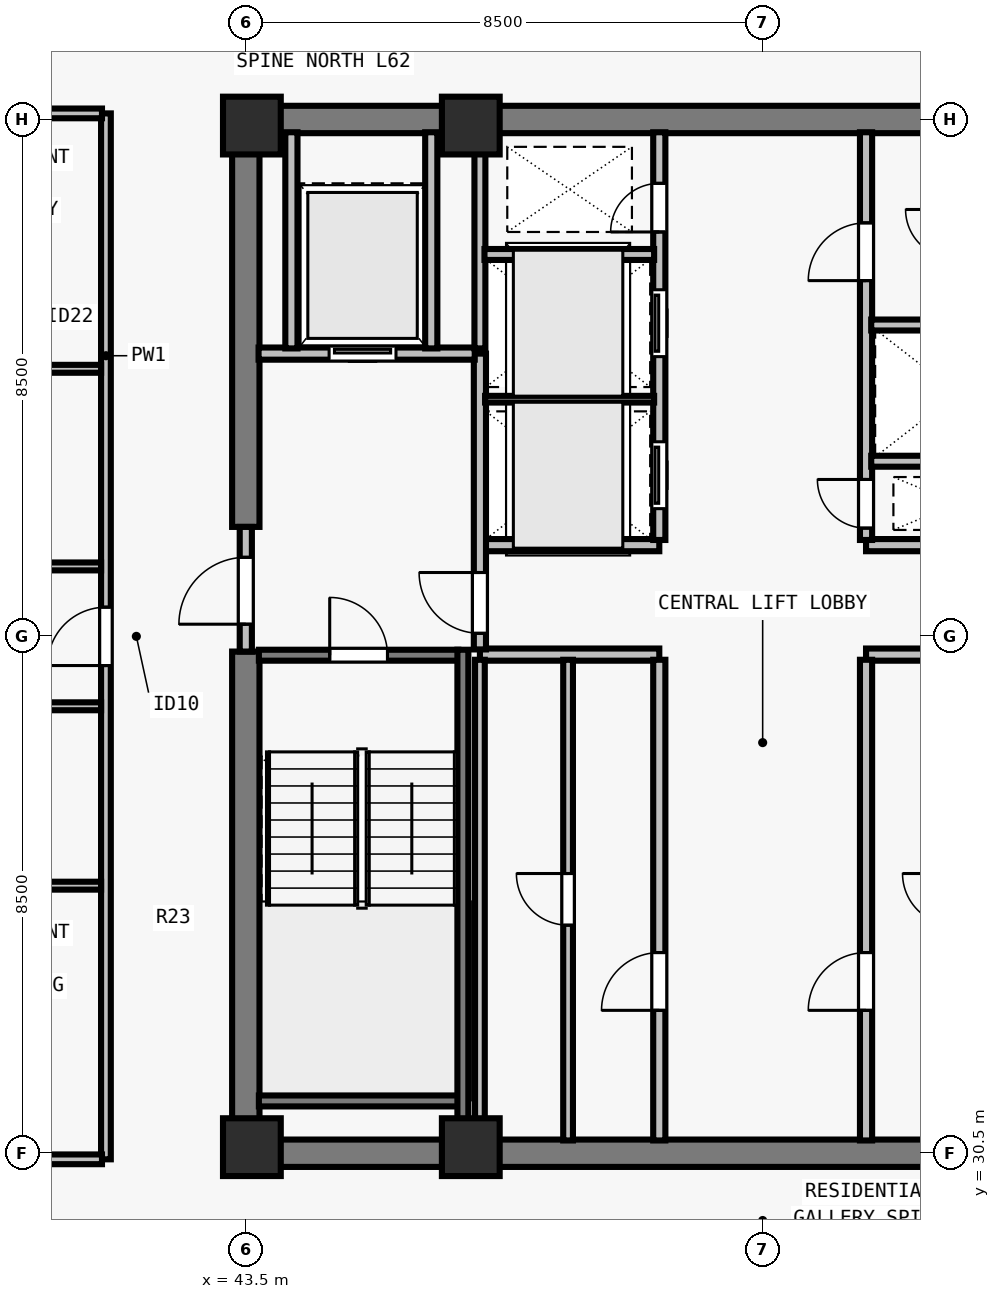
"""IFC4 building model, lengths in metres.
Left out: names, types, materials, properties, quantities, classifications, styles, units other than length and angle.
Written with IfcOpenShell. Run it as: python <this file> out.ifc"""

import sys

from ifc_helpers import new_model, si_unit, direction, frame, frame_2d, origin, origin_2d, place, context, subcontext, project, spatial, rectangle, extrude, element, fill, save


model = new_model("IFC4")
c1 = context("Model", 3, precision=1e-05, world=origin(), true_north=direction((0.0, 1.0)))
c2 = subcontext(c1, "Body", "Model", "MODEL_VIEW")
j1 = project(units=[si_unit("LENGTHUNIT", "METRE"), si_unit("PLANEANGLEUNIT", "RADIAN")], contexts=[c1])
p1 = place(None, origin())
s1 = spatial("IfcSite", under=j1, at=p1, CompositionType="ELEMENT")
p2 = place(p1, origin())
s2 = spatial("IfcBuilding", under=s1, at=p2, CompositionType="ELEMENT")
p3 = place(p2, frame((0.0, 0.0, 227.0)))
s3 = spatial("IfcBuildingStorey", under=s2, at=p3, CompositionType="ELEMENT", Elevation=227.0)
for number, where, z_axis, x_axis in (
    (1, (43.6, 30.6, 0.0), (0.0, 0.0, 1.0), (1.0, 0.0, 0.0)),
    (2, (47.2, 30.6, 0.0), (0.0, 0.0, 1.0), (1.0, 0.0, 0.0)),
    (3, (43.6, 47.4, 0.0), (0.0, 0.0, 1.0), (1.0, 0.0, 0.0)),
    (4, (47.2, 47.4, 0.0), (0.0, 0.0, 1.0), (1.0, 0.0, 0.0)),
):
    element("IfcColumn", number, at=place(p3, frame(where, z_axis=z_axis, x_axis=x_axis)), inside=s3, PredefinedType="COLUMN", context=c2, shape_type="SweptSolid", body=[
        extrude(rectangle(XDim=0.95, YDim=0.95, at=origin_2d()), origin(), (0.0, 0.0, 1.0), 3.5),
    ])
for number, where, z_axis, x_axis in (
    (5, (43.275, 30.5, 0.0), (0.0, 0.0, 1.0), (1.0, 0.0, 0.0)),
    (6, (43.275, 47.5, 0.0), (0.0, 0.0, 1.0), (1.0, 0.0, 0.0)),
):
    element("IfcWall", number, at=place(p3, frame(where, z_axis=z_axis, x_axis=x_axis)), inside=s3, PredefinedType="SHEAR", context=c2, shape_type="SweptSolid", body=[
        extrude(rectangle(XDim=17.45, YDim=0.45, at=frame_2d((8.725, 0.0))), origin(), (0.0, 0.0, 1.0), 3.29),
    ])
p4 = place(p3, frame((43.5, 30.715, 0.0), z_axis=(0.0, 0.0, 1.0), x_axis=(0.0, 1.0, 0.0)))
e7 = element("IfcWall", 7, at=p4, inside=s3, PredefinedType="SHEAR", context=c2, shape_type="SweptSolid", body=[
    extrude(rectangle(XDim=8.035, YDim=0.45, at=frame_2d((4.018, 0.0))), origin(), (0.0, 0.0, 1.0), 3.29),
])
p5 = place(p3, frame((43.5, 40.8, 0.0), z_axis=(0.0, 0.0, 1.0), x_axis=(0.0, 1.0, 0.0)))
e8 = element("IfcWall", 8, at=p5, inside=s3, PredefinedType="SHEAR", context=c2, shape_type="SweptSolid", body=[
    extrude(rectangle(XDim=6.485, YDim=0.45, at=frame_2d((3.242, 0.0))), origin(), (0.0, 0.0, 1.0), 3.29),
])
for number, where, z_axis, x_axis in (
    (9, (47.35, 38.7, 0.0), (0.0, 0.0, 1.0), (1.0, 0.0, 0.0)),
    (10, (47.35, 40.5, 0.0), (0.0, 0.0, 1.0), (1.0, 0.0, 0.0)),
    (11, (53.7, 38.7, 0.0), (0.0, 0.0, 1.0), (1.0, 0.0, 0.0)),
    (12, (53.7, 40.5, 0.0), (0.0, 0.0, 1.0), (1.0, 0.0, 0.0)),
):
    element("IfcWall", number, at=place(p3, frame(where, z_axis=z_axis, x_axis=x_axis)), inside=s3, PredefinedType="SOLIDWALL", context=c2, shape_type="SweptSolid", body=[
        extrude(rectangle(XDim=2.95, YDim=0.2, at=frame_2d((1.475, 0.0))), origin(), (0.0, 0.0, 1.0), 3.29),
    ])
p6 = place(p3, frame((50.3, 30.71, 0.0), z_axis=(0.0, 0.0, 1.0), x_axis=(0.0, 1.0, 0.0)))
e13 = element("IfcWall", 13, at=p6, inside=s3, PredefinedType="SOLIDWALL", context=c2, shape_type="SweptSolid", body=[
    extrude(rectangle(XDim=7.905, YDim=0.2, at=frame_2d((3.953, 0.0))), origin(), (0.0, 0.0, 1.0), 3.29),
])
p7 = place(p6, frame((2.14, 0.0, 0.0)))
e14 = element("IfcOpeningElement", 14, at=p7, cuts=e13, PredefinedType="OPENING", context=c2, shape_type="SweptSolid", body=[
    extrude(rectangle(XDim=0.95, YDim=2.12, at=frame_2d((0.475, 1.06))), frame((0.0, 0.11, 0.0), z_axis=(0.0, -1.0, 0.0), x_axis=(1.0, 0.0, 0.0)), (0.0, 0.0, 1.0), 0.22),
])
p8 = place(p3, frame((53.7, 30.71, 0.0), z_axis=(0.0, 0.0, 1.0), x_axis=(0.0, 1.0, 0.0)))
e15 = element("IfcWall", 15, at=p8, inside=s3, PredefinedType="SOLIDWALL", context=c2, shape_type="SweptSolid", body=[
    extrude(rectangle(XDim=7.905, YDim=0.2, at=frame_2d((3.953, 0.0))), origin(), (0.0, 0.0, 1.0), 3.29),
])
p9 = place(p8, frame((2.14, 0.0, 0.0)))
e16 = element("IfcOpeningElement", 16, at=p9, cuts=e15, PredefinedType="OPENING", context=c2, shape_type="SweptSolid", body=[
    extrude(rectangle(XDim=0.95, YDim=2.12, at=frame_2d((0.475, 1.06))), frame((0.0, 0.11, 0.0), z_axis=(0.0, -1.0, 0.0), x_axis=(1.0, 0.0, 0.0)), (0.0, 0.0, 1.0), 0.22),
])
p10 = place(p3, frame((50.3, 40.585, 0.0), z_axis=(0.0, 0.0, 1.0), x_axis=(0.0, 1.0, 0.0)))
e17 = element("IfcWall", 17, at=p10, inside=s3, PredefinedType="SOLIDWALL", context=c2, shape_type="SweptSolid", body=[
    extrude(rectangle(XDim=6.705, YDim=0.2, at=frame_2d((3.353, 0.0))), origin(), (0.0, 0.0, 1.0), 3.29),
])
p11 = place(p10, frame((0.515, 0.0, 0.0)))
e18 = element("IfcOpeningElement", 18, at=p11, cuts=e17, PredefinedType="OPENING", context=c2, shape_type="SweptSolid", body=[
    extrude(rectangle(XDim=1.1, YDim=2.2, at=frame_2d((0.55, 1.1))), frame((0.0, 0.11, 0.0), z_axis=(0.0, -1.0, 0.0), x_axis=(1.0, 0.0, 0.0)), (0.0, 0.0, 1.0), 0.22),
])
p12 = place(p10, frame((3.015, 0.0, 0.0)))
e19 = element("IfcOpeningElement", 19, at=p12, cuts=e17, PredefinedType="OPENING", context=c2, shape_type="SweptSolid", body=[
    extrude(rectangle(XDim=1.1, YDim=2.2, at=frame_2d((0.55, 1.1))), frame((0.0, 0.11, 0.0), z_axis=(0.0, -1.0, 0.0), x_axis=(1.0, 0.0, 0.0)), (0.0, 0.0, 1.0), 0.22),
])
p13 = place(p10, frame((5.065, 0.0, 0.0)))
e20 = element("IfcOpeningElement", 20, at=p13, cuts=e17, PredefinedType="OPENING", context=c2, shape_type="SweptSolid", body=[
    extrude(rectangle(XDim=0.8, YDim=2.08, at=frame_2d((0.4, 1.04))), frame((0.0, 0.11, 0.0), z_axis=(0.0, -1.0, 0.0), x_axis=(1.0, 0.0, 0.0)), (0.0, 0.0, 1.0), 0.22),
])
p14 = place(p3, frame((53.7, 40.585, 0.0), z_axis=(0.0, 0.0, 1.0), x_axis=(0.0, 1.0, 0.0)))
e21 = element("IfcWall", 21, at=p14, inside=s3, PredefinedType="SOLIDWALL", context=c2, shape_type="SweptSolid", body=[
    extrude(rectangle(XDim=6.705, YDim=0.2, at=frame_2d((3.353, 0.0))), origin(), (0.0, 0.0, 1.0), 3.29),
])
p15 = place(p14, frame((0.195, 0.0, 0.0)))
e22 = element("IfcOpeningElement", 22, at=p15, cuts=e21, PredefinedType="OPENING", context=c2, shape_type="SweptSolid", body=[
    extrude(rectangle(XDim=0.8, YDim=2.08, at=frame_2d((0.4, 1.04))), frame((0.0, 0.11, 0.0), z_axis=(0.0, -1.0, 0.0), x_axis=(1.0, 0.0, 0.0)), (0.0, 0.0, 1.0), 0.22),
])
p16 = place(p14, frame((4.265, 0.0, 0.0)))
e23 = element("IfcOpeningElement", 23, at=p16, cuts=e21, PredefinedType="OPENING", context=c2, shape_type="SweptSolid", body=[
    extrude(rectangle(XDim=0.95, YDim=2.12, at=frame_2d((0.475, 1.06))), frame((0.0, 0.11, 0.0), z_axis=(0.0, -1.0, 0.0), x_axis=(1.0, 0.0, 0.0)), (0.0, 0.0, 1.0), 0.22),
])
p17 = place(p3, frame((43.5, 38.75, 0.0), z_axis=(0.0, 0.0, 1.0), x_axis=(0.0, 1.0, 0.0)))
e24 = element("IfcWall", 24, at=p17, inside=s3, PredefinedType="SOLIDWALL", context=c2, shape_type="SweptSolid", body=[
    extrude(rectangle(XDim=2.05, YDim=0.2, at=frame_2d((1.025, 0.0))), origin(), (0.0, 0.0, 1.0), 3.29),
])
p18 = place(p17, frame((0.45, 0.0, 0.0)))
e25 = element("IfcOpeningElement", 25, at=p18, cuts=e24, PredefinedType="OPENING", context=c2, shape_type="SweptSolid", body=[
    extrude(rectangle(XDim=1.1, YDim=2.15, at=frame_2d((0.55, 1.075))), frame((0.0, 0.11, 0.0), z_axis=(0.0, -1.0, 0.0), x_axis=(1.0, 0.0, 0.0)), (0.0, 0.0, 1.0), 0.22),
])
p19 = place(p3, frame((47.35, 38.785, 0.0), z_axis=(0.0, 0.0, 1.0), x_axis=(0.0, 1.0, 0.0)))
e26 = element("IfcWall", 26, at=p19, inside=s3, PredefinedType="SOLIDWALL", context=c2, shape_type="SweptSolid", body=[
    extrude(rectangle(XDim=4.865, YDim=0.2, at=frame_2d((2.433, 0.0))), origin(), (0.0, 0.0, 1.0), 3.29),
])
p20 = place(p19, frame((0.265, 0.0, 0.0)))
e27 = element("IfcOpeningElement", 27, at=p20, cuts=e26, PredefinedType="OPENING", context=c2, shape_type="SweptSolid", body=[
    extrude(rectangle(XDim=1.0, YDim=2.15, at=frame_2d((0.5, 1.075))), frame((0.0, 0.11, 0.0), z_axis=(0.0, -1.0, 0.0), x_axis=(1.0, 0.0, 0.0)), (0.0, 0.0, 1.0), 0.22),
])
p21 = place(p3, frame((43.71, 43.65, 0.0), z_axis=(0.0, 0.0, 1.0), x_axis=(1.0, 0.0, 0.0)))
e28 = element("IfcWall", 28, at=p21, inside=s3, PredefinedType="SOLIDWALL", context=c2, shape_type="SweptSolid", body=[
    extrude(rectangle(XDim=3.555, YDim=0.2, at=frame_2d((1.777, 0.0))), origin(), (0.0, 0.0, 1.0), 3.29),
])
p22 = place(p21, frame((1.16, 0.0, 0.0)))
e29 = element("IfcOpeningElement", 29, at=p22, cuts=e28, PredefinedType="OPENING", context=c2, shape_type="SweptSolid", body=[
    extrude(rectangle(XDim=1.1, YDim=2.2, at=frame_2d((0.55, 1.1))), frame((0.0, 0.11, 0.0), z_axis=(0.0, -1.0, 0.0), x_axis=(1.0, 0.0, 0.0)), (0.0, 0.0, 1.0), 0.22),
])
for number, where, z_axis, x_axis in (
    (30, (46.55, 43.735, 0.0), (0.0, 0.0, 1.0), (0.0, 1.0, 0.0)),
    (31, (44.25, 43.735, 0.0), (0.0, 0.0, 1.0), (0.0, 1.0, 0.0)),
):
    element("IfcWall", number, at=place(p3, frame(where, z_axis=z_axis, x_axis=x_axis)), inside=s3, PredefinedType="SOLIDWALL", context=c2, shape_type="SweptSolid", body=[
        extrude(rectangle(XDim=3.555, YDim=0.2, at=frame_2d((1.777, 0.0))), origin(), (0.0, 0.0, 1.0), 3.29),
    ])
p23 = place(p3, frame((47.35, 30.71, 0.0), z_axis=(0.0, 0.0, 1.0), x_axis=(0.0, 1.0, 0.0)))
e32 = element("IfcWall", 32, at=p23, inside=s3, PredefinedType="PARTITIONING", context=c2, shape_type="SweptSolid", body=[
    extrude(rectangle(XDim=7.905, YDim=0.16, at=frame_2d((3.953, 0.0))), origin(), (0.0, 0.0, 1.0), 3.29),
])
p24 = place(p3, frame((48.8, 30.71, 0.0), z_axis=(0.0, 0.0, 1.0), x_axis=(0.0, 1.0, 0.0)))
e33 = element("IfcWall", 33, at=p24, inside=s3, PredefinedType="PARTITIONING", context=c2, shape_type="SweptSolid", body=[
    extrude(rectangle(XDim=7.905, YDim=0.16, at=frame_2d((3.953, 0.0))), origin(), (0.0, 0.0, 1.0), 3.29),
])
p25 = place(p24, frame((3.54, 0.0, 0.0)))
e34 = element("IfcOpeningElement", 34, at=p25, cuts=e33, PredefinedType="OPENING", context=c2, shape_type="SweptSolid", body=[
    extrude(rectangle(XDim=0.85, YDim=2.12, at=frame_2d((0.425, 1.06))), frame((0.0, 0.09, 0.0), z_axis=(0.0, -1.0, 0.0), x_axis=(1.0, 0.0, 0.0)), (0.0, 0.0, 1.0), 0.18),
])
p26 = place(p3, frame((47.35, 43.735, 0.0), z_axis=(0.0, 0.0, 1.0), x_axis=(0.0, 1.0, 0.0)))
e35 = element("IfcWall", 35, at=p26, inside=s3, PredefinedType="SOLIDWALL", context=c2, shape_type="SweptSolid", body=[
    extrude(rectangle(XDim=3.555, YDim=0.18, at=frame_2d((1.777, 0.0))), origin(), (0.0, 0.0, 1.0), 3.29),
])
p27 = place(p3, frame((47.435, 42.9, 0.0), z_axis=(0.0, 0.0, 1.0), x_axis=(1.0, 0.0, 0.0)))
e36 = element("IfcWall", 36, at=p27, inside=s3, PredefinedType="PARTITIONING", context=c2, shape_type="SweptSolid", body=[
    extrude(rectangle(XDim=2.78, YDim=0.11, at=frame_2d((1.39, 0.0))), origin(), (0.0, 0.0, 1.0), 3.29),
])
p28 = place(p3, frame((47.425, 45.28, 0.0), z_axis=(0.0, 0.0, 1.0), x_axis=(1.0, 0.0, 0.0)))
e37 = element("IfcWall", 37, at=p28, inside=s3, PredefinedType="SOLIDWALL", context=c2, shape_type="SweptSolid", body=[
    extrude(rectangle(XDim=2.79, YDim=0.18, at=frame_2d((1.395, 0.0))), origin(), (0.0, 0.0, 1.0), 3.29),
])
p29 = place(p3, frame((53.785, 41.88, 0.0), z_axis=(0.0, 0.0, 1.0), x_axis=(1.0, 0.0, 0.0)))
e38 = element("IfcWall", 38, at=p29, inside=s3, PredefinedType="SOLIDWALL", context=c2, shape_type="SweptSolid", body=[
    extrude(rectangle(XDim=2.78, YDim=0.18, at=frame_2d((1.39, 0.0))), origin(), (0.0, 0.0, 1.0), 3.29),
])
p30 = place(p3, frame((53.785, 44.12, 0.0), z_axis=(0.0, 0.0, 1.0), x_axis=(1.0, 0.0, 0.0)))
e39 = element("IfcWall", 39, at=p30, inside=s3, PredefinedType="SOLIDWALL", context=c2, shape_type="SweptSolid", body=[
    extrude(rectangle(XDim=2.79, YDim=0.18, at=frame_2d((1.395, 0.0))), origin(), (0.0, 0.0, 1.0), 3.29),
])
p31 = place(p3, frame((41.2, 30.4, 0.0), z_axis=(0.0, 0.0, 1.0), x_axis=(0.0, 1.0, 0.0)))
e40 = element("IfcWall", 40, at=p31, inside=s3, PredefinedType="PARTITIONING", context=c2, shape_type="SweptSolid", body=[
    extrude(rectangle(XDim=17.2, YDim=0.16, at=frame_2d((8.6, 0.0))), origin(), (0.0, 0.0, 1.0), 3.29),
])
p32 = place(p31, frame((8.12, 0.0, 0.0)))
e41 = element("IfcOpeningElement", 41, at=p32, cuts=e40, PredefinedType="OPENING", context=c2, shape_type="SweptSolid", body=[
    extrude(rectangle(XDim=0.96, YDim=2.18, at=frame_2d((0.48, 1.09))), frame((0.0, 0.09, 0.0), z_axis=(0.0, -1.0, 0.0), x_axis=(1.0, 0.0, 0.0)), (0.0, 0.0, 1.0), 0.18),
])
p33 = place(p3, frame((29.805, 30.4, 0.0), z_axis=(0.0, 0.0, 1.0), x_axis=(1.0, 0.0, 0.0)))
e42 = element("IfcWall", 42, at=p33, inside=s3, PredefinedType="PARTITIONING", context=c2, shape_type="SweptSolid", body=[
    extrude(rectangle(XDim=11.33, YDim=0.16, at=frame_2d((5.665, 0.0))), origin(), (0.0, 0.0, 1.0), 3.29),
])
p34 = place(p3, frame((29.77, 47.6, 0.0), z_axis=(0.0, 0.0, 1.0), x_axis=(1.0, 0.0, 0.0)))
e43 = element("IfcWall", 43, at=p34, inside=s3, PredefinedType="PARTITIONING", context=c2, shape_type="SweptSolid", body=[
    extrude(rectangle(XDim=11.365, YDim=0.16, at=frame_2d((5.683, 0.0))), origin(), (0.0, 0.0, 1.0), 3.29),
])
p35 = place(p3, frame((38.37, 34.9, 0.0), z_axis=(0.0, 0.0, 1.0), x_axis=(1.0, 0.0, 0.0)))
e44 = element("IfcWall", 44, at=p35, inside=s3, PredefinedType="PLUMBINGWALL", context=c2, shape_type="SweptSolid", body=[
    extrude(rectangle(XDim=2.75, YDim=0.13, at=frame_2d((1.375, 0.0))), origin(), (0.0, 0.0, 1.0), 3.29),
])
p36 = place(p3, frame((38.37, 37.85, 0.0), z_axis=(0.0, 0.0, 1.0), x_axis=(1.0, 0.0, 0.0)))
e45 = element("IfcWall", 45, at=p36, inside=s3, PredefinedType="PLUMBINGWALL", context=c2, shape_type="SweptSolid", body=[
    extrude(rectangle(XDim=2.75, YDim=0.13, at=frame_2d((1.375, 0.0))), origin(), (0.0, 0.0, 1.0), 3.29),
])
p37 = place(p36, frame((0.55, 0.0, 0.0)))
e46 = element("IfcOpeningElement", 46, at=p37, cuts=e45, PredefinedType="OPENING", context=c2, shape_type="SweptSolid", body=[
    extrude(rectangle(XDim=0.85, YDim=2.08, at=frame_2d((0.425, 1.04))), frame((0.0, 0.075, 0.0), z_axis=(0.0, -1.0, 0.0), x_axis=(1.0, 0.0, 0.0)), (0.0, 0.0, 1.0), 0.15),
])
p38 = place(p3, frame((38.37, 43.4, 0.0), z_axis=(0.0, 0.0, 1.0), x_axis=(1.0, 0.0, 0.0)))
e47 = element("IfcWall", 47, at=p38, inside=s3, PredefinedType="PLUMBINGWALL", context=c2, shape_type="SweptSolid", body=[
    extrude(rectangle(XDim=2.75, YDim=0.13, at=frame_2d((1.375, 0.0))), origin(), (0.0, 0.0, 1.0), 2.958),
])
p39 = place(p3, frame((38.37, 40.15, 0.0), z_axis=(0.0, 0.0, 1.0), x_axis=(1.0, 0.0, 0.0)))
e48 = element("IfcWall", 48, at=p39, inside=s3, PredefinedType="PLUMBINGWALL", context=c2, shape_type="SweptSolid", body=[
    extrude(rectangle(XDim=2.75, YDim=0.13, at=frame_2d((1.375, 0.0))), origin(), (0.0, 0.0, 1.0), 3.29),
])
p40 = place(p39, frame((0.55, 0.0, 0.0)))
e49 = element("IfcOpeningElement", 49, at=p40, cuts=e48, PredefinedType="OPENING", context=c2, shape_type="SweptSolid", body=[
    extrude(rectangle(XDim=0.88, YDim=2.1, at=frame_2d((0.44, 1.05))), frame((0.0, 0.075, 0.0), z_axis=(0.0, -1.0, 0.0), x_axis=(1.0, 0.0, 0.0)), (0.0, 0.0, 1.0), 0.15),
])
p41 = place(p3, frame((43.715, 38.69, 0.0), z_axis=(0.0, 0.0, 1.0), x_axis=(1.0, 0.0, 0.0)))
e50 = element("IfcWall", 50, at=p41, inside=s3, PredefinedType="SOLIDWALL", context=c2, shape_type="SweptSolid", body=[
    extrude(rectangle(XDim=3.28, YDim=0.18, at=frame_2d((1.64, 0.0))), origin(), (0.0, 0.0, 1.0), 3.29),
])
p42 = place(p41, frame((1.165, 0.0, 0.0)))
e51 = element("IfcOpeningElement", 51, at=p42, cuts=e50, PredefinedType="OPENING", context=c2, shape_type="SweptSolid", body=[
    extrude(rectangle(XDim=0.95, YDim=2.15, at=frame_2d((0.475, 1.075))), frame((0.0, 0.1, 0.0), z_axis=(0.0, -1.0, 0.0), x_axis=(1.0, 0.0, 0.0)), (0.0, 0.0, 1.0), 0.2),
])
p43 = place(p3, frame((43.715, 31.36, 0.0), z_axis=(0.0, 0.0, 1.0), x_axis=(1.0, 0.0, 0.0)))
e52 = element("IfcWall", 52, at=p43, inside=s3, PredefinedType="SOLIDWALL", context=c2, shape_type="SweptSolid", body=[
    extrude(rectangle(XDim=3.28, YDim=0.18, at=frame_2d((1.64, 0.0))), origin(), (0.0, 0.0, 1.0), 3.29),
])
p44 = place(p3, frame((47.07, 38.78, 0.0), z_axis=(0.0, 0.0, 1.0), x_axis=(0.0, -1.0, 0.0)))
e53 = element("IfcWall", 53, at=p44, inside=s3, PredefinedType="SOLIDWALL", context=c2, shape_type="SweptSolid", body=[
    extrude(rectangle(XDim=8.067, YDim=0.18, at=frame_2d((4.034, 0.0))), origin(), (0.0, 0.0, 1.0), 3.29),
])
p45 = place(p18, origin())
e54 = element("IfcDoor", 54, at=p45, inside=s3, OperationType="SINGLE_SWING_LEFT", PredefinedType="DOOR", context=c2, shape_type="SweptSolid", body=[
    extrude(rectangle(XDim=1.1, YDim=2.15, at=frame_2d((0.55, 1.075))), frame((0.0, 0.025, 0.0), z_axis=(0.0, -1.0, 0.0), x_axis=(1.0, 0.0, 0.0)), (0.0, 0.0, 1.0), 0.05),
])
fill(e25, e54)
p46 = place(p20, origin())
e55 = element("IfcDoor", 55, at=p46, inside=s3, OperationType="SINGLE_SWING_RIGHT", PredefinedType="DOOR", context=c2, shape_type="SweptSolid", body=[
    extrude(rectangle(XDim=1.0, YDim=2.15, at=frame_2d((0.5, 1.075))), frame((0.0, 0.025, 0.0), z_axis=(0.0, -1.0, 0.0), x_axis=(1.0, 0.0, 0.0)), (0.0, 0.0, 1.0), 0.05),
])
fill(e27, e55)
p47 = place(p22, origin())
e56 = element("IfcDoor", 56, at=p47, inside=s3, OperationType="SLIDING_TO_LEFT", PredefinedType="DOOR", context=c2, shape_type="SweptSolid", body=[
    extrude(rectangle(XDim=1.1, YDim=2.2, at=frame_2d((0.55, 1.1))), frame((0.0, 0.025, 0.0), z_axis=(0.0, -1.0, 0.0), x_axis=(1.0, 0.0, 0.0)), (0.0, 0.0, 1.0), 0.05),
])
fill(e29, e56)
p48 = place(p7, origin())
e57 = element("IfcDoor", 57, at=p48, inside=s3, OperationType="SINGLE_SWING_LEFT", PredefinedType="DOOR", context=c2, shape_type="SweptSolid", body=[
    extrude(rectangle(XDim=0.95, YDim=2.12, at=frame_2d((0.475, 1.06))), frame((0.0, 0.025, 0.0), z_axis=(0.0, -1.0, 0.0), x_axis=(1.0, 0.0, 0.0)), (0.0, 0.0, 1.0), 0.05),
])
fill(e14, e57)
p49 = place(p25, origin())
e58 = element("IfcDoor", 58, at=p49, inside=s3, OperationType="SINGLE_SWING_RIGHT", PredefinedType="DOOR", context=c2, shape_type="SweptSolid", body=[
    extrude(rectangle(XDim=0.85, YDim=2.12, at=frame_2d((0.425, 1.06))), frame((0.0, 0.025, 0.0), z_axis=(0.0, -1.0, 0.0), x_axis=(1.0, 0.0, 0.0)), (0.0, 0.0, 1.0), 0.05),
])
fill(e34, e58)
p50 = place(p9, origin())
e59 = element("IfcDoor", 59, at=p50, inside=s3, OperationType="SINGLE_SWING_LEFT", PredefinedType="DOOR", context=c2, shape_type="SweptSolid", body=[
    extrude(rectangle(XDim=0.95, YDim=2.12, at=frame_2d((0.475, 1.06))), frame((0.0, 0.025, 0.0), z_axis=(0.0, -1.0, 0.0), x_axis=(1.0, 0.0, 0.0)), (0.0, 0.0, 1.0), 0.05),
])
fill(e16, e59)
p51 = place(p11, origin())
e60 = element("IfcDoor", 60, at=p51, inside=s3, OperationType="SLIDING_TO_LEFT", PredefinedType="DOOR", context=c2, shape_type="SweptSolid", body=[
    extrude(rectangle(XDim=1.1, YDim=2.2, at=frame_2d((0.55, 1.1))), frame((0.0, 0.025, 0.0), z_axis=(0.0, -1.0, 0.0), x_axis=(1.0, 0.0, 0.0)), (0.0, 0.0, 1.0), 0.05),
])
fill(e18, e60)
p52 = place(p12, origin())
e61 = element("IfcDoor", 61, at=p52, inside=s3, OperationType="SLIDING_TO_LEFT", PredefinedType="DOOR", context=c2, shape_type="SweptSolid", body=[
    extrude(rectangle(XDim=1.1, YDim=2.2, at=frame_2d((0.55, 1.1))), frame((0.0, 0.025, 0.0), z_axis=(0.0, -1.0, 0.0), x_axis=(1.0, 0.0, 0.0)), (0.0, 0.0, 1.0), 0.05),
])
fill(e19, e61)
p53 = place(p13, origin())
e62 = element("IfcDoor", 62, at=p53, inside=s3, OperationType="SINGLE_SWING_LEFT", PredefinedType="DOOR", context=c2, shape_type="SweptSolid", body=[
    extrude(rectangle(XDim=0.8, YDim=2.08, at=frame_2d((0.4, 1.04))), frame((0.0, 0.025, 0.0), z_axis=(0.0, -1.0, 0.0), x_axis=(1.0, 0.0, 0.0)), (0.0, 0.0, 1.0), 0.05),
])
fill(e20, e62)
p54 = place(p15, origin())
e63 = element("IfcDoor", 63, at=p54, inside=s3, OperationType="SINGLE_SWING_RIGHT", PredefinedType="DOOR", context=c2, shape_type="SweptSolid", body=[
    extrude(rectangle(XDim=0.8, YDim=2.08, at=frame_2d((0.4, 1.04))), frame((0.0, 0.025, 0.0), z_axis=(0.0, -1.0, 0.0), x_axis=(1.0, 0.0, 0.0)), (0.0, 0.0, 1.0), 0.05),
])
fill(e22, e63)
p55 = place(p16, origin())
e64 = element("IfcDoor", 64, at=p55, inside=s3, OperationType="SINGLE_SWING_LEFT", PredefinedType="DOOR", context=c2, shape_type="SweptSolid", body=[
    extrude(rectangle(XDim=0.95, YDim=2.12, at=frame_2d((0.475, 1.06))), frame((0.0, 0.025, 0.0), z_axis=(0.0, -1.0, 0.0), x_axis=(1.0, 0.0, 0.0)), (0.0, 0.0, 1.0), 0.05),
])
fill(e23, e64)
p56 = place(p32, origin())
e65 = element("IfcDoor", 65, at=p56, inside=s3, OperationType="SINGLE_SWING_LEFT", PredefinedType="DOOR", context=c2, shape_type="SweptSolid", body=[
    extrude(rectangle(XDim=0.96, YDim=2.18, at=frame_2d((0.48, 1.09))), frame((0.0, 0.025, 0.0), z_axis=(0.0, -1.0, 0.0), x_axis=(1.0, 0.0, 0.0)), (0.0, 0.0, 1.0), 0.05),
])
fill(e41, e65)
p57 = place(p42, origin())
e66 = element("IfcDoor", 66, at=p57, inside=s3, OperationType="SINGLE_SWING_LEFT", PredefinedType="DOOR", context=c2, shape_type="SweptSolid", body=[
    extrude(rectangle(XDim=0.95, YDim=2.15, at=frame_2d((0.475, 1.075))), frame((0.0, 0.025, 0.0), z_axis=(0.0, -1.0, 0.0), x_axis=(1.0, 0.0, 0.0)), (0.0, 0.0, 1.0), 0.05),
])
fill(e51, e66)
save(model, sys.argv[1])
